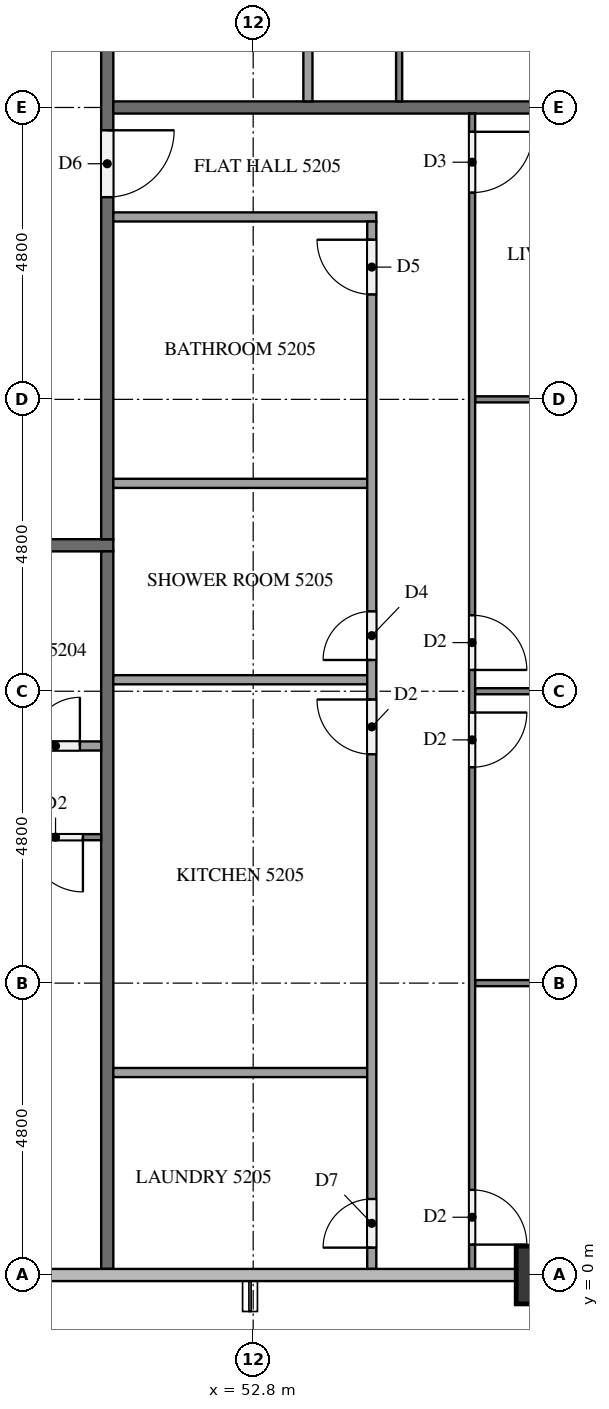
"""IFC4 building model, lengths in metres.
Left out: names, types, materials, properties, quantities, classifications, styles, units other than length and angle.
Written with IfcOpenShell. Run it as: python <this file> out.ifc"""

import sys

from ifc_helpers import new_model, si_unit, direction, frame, frame_2d, origin, origin_2d, place, context, subcontext, project, spatial, rectangle, extrude, element, fill, save


model = new_model("IFC4")
c1 = context("Model", 3, precision=1e-05, world=origin(), true_north=direction((0.0, 1.0)))
c2 = subcontext(c1, "Body", "Model", "MODEL_VIEW")
j1 = project(units=[si_unit("LENGTHUNIT", "METRE"), si_unit("PLANEANGLEUNIT", "RADIAN")], contexts=[c1])
p1 = place(None, origin())
s1 = spatial("IfcSite", under=j1, at=p1, CompositionType="ELEMENT")
p2 = place(p1, origin())
s2 = spatial("IfcBuilding", under=s1, at=p2, CompositionType="ELEMENT")
p3 = place(p2, frame((0.0, 0.0, 199.9)))
s3 = spatial("IfcBuildingStorey", under=s2, at=p3, CompositionType="ELEMENT", Elevation=199.9)
p4 = place(p3, frame((57.6, 0.0, 0.0), z_axis=(0.0, 0.0, 1.0), x_axis=(1.0, 0.0, 0.0)))
e1 = element("IfcColumn", 1, at=p4, inside=s3, PredefinedType="COLUMN", context=c2, shape_type="SweptSolid", body=[
    extrude(rectangle(XDim=0.95, YDim=0.95, at=origin_2d()), origin(), (0.0, 0.0, 1.0), 3.1),
])
p5 = place(p3, frame((50.5, 12.0, 0.0), z_axis=(0.0, 0.0, 1.0), x_axis=(-1.0, 0.0, 0.0)))
e2 = element("IfcWall", 2, at=p5, inside=s3, PredefinedType="PARTITIONING", context=c2, shape_type="SweptSolid", body=[
    extrude(rectangle(XDim=38.6, YDim=0.2, at=frame_2d((19.3, 0.0))), origin(), (0.0, 0.0, 1.0), 3.1),
])
p6 = place(p5, frame((26.875, 0.0, 0.0)))
e3 = element("IfcOpeningElement", 3, at=p6, cuts=e2, PredefinedType="OPENING", context=c2, shape_type="SweptSolid", body=[
    extrude(rectangle(XDim=1.1, YDim=2.1, at=frame_2d((0.55, 1.05))), frame((0.0, 0.11, 0.0), z_axis=(0.0, -1.0, 0.0), x_axis=(1.0, 0.0, 0.0)), (0.0, 0.0, 1.0), 0.22),
])
p7 = place(p5, frame((25.075, 0.0, 0.0)))
e4 = element("IfcOpeningElement", 4, at=p7, cuts=e2, PredefinedType="OPENING", context=c2, shape_type="SweptSolid", body=[
    extrude(rectangle(XDim=1.0, YDim=2.1, at=frame_2d((0.5, 1.05))), frame((0.0, 0.11, 0.0), z_axis=(0.0, -1.0, 0.0), x_axis=(1.0, 0.0, 0.0)), (0.0, 0.0, 1.0), 0.22),
])
p8 = place(p5, frame((10.125, 0.0, 0.0)))
e5 = element("IfcOpeningElement", 5, at=p8, cuts=e2, PredefinedType="OPENING", context=c2, shape_type="SweptSolid", body=[
    extrude(rectangle(XDim=1.0, YDim=2.1, at=frame_2d((0.5, 1.05))), frame((0.0, 0.11, 0.0), z_axis=(0.0, -1.0, 0.0), x_axis=(1.0, 0.0, 0.0)), (0.0, 0.0, 1.0), 0.22),
])
p9 = place(p5, frame((8.275, 0.0, 0.0)))
e6 = element("IfcOpeningElement", 6, at=p9, cuts=e2, PredefinedType="OPENING", context=c2, shape_type="SweptSolid", body=[
    extrude(rectangle(XDim=1.0, YDim=2.1, at=frame_2d((0.5, 1.05))), frame((0.0, 0.11, 0.0), z_axis=(0.0, -1.0, 0.0), x_axis=(1.0, 0.0, 0.0)), (0.0, 0.0, 1.0), 0.22),
])
p10 = place(p3, frame((50.4, 40.7, 0.0), z_axis=(0.0, 0.0, 1.0), x_axis=(0.0, -1.0, 0.0)))
e7 = element("IfcWall", 7, at=p10, inside=s3, PredefinedType="PARTITIONING", context=c2, shape_type="SweptSolid", body=[
    extrude(rectangle(XDim=28.6, YDim=0.2, at=frame_2d((14.3, 0.0))), origin(), (0.0, 0.0, 1.0), 3.1),
])
p11 = place(p10, frame((21.875, 0.0, 0.0)))
e8 = element("IfcOpeningElement", 8, at=p11, cuts=e7, PredefinedType="OPENING", context=c2, shape_type="SweptSolid", body=[
    extrude(rectangle(XDim=1.1, YDim=2.1, at=frame_2d((0.55, 1.05))), frame((0.0, 0.11, 0.0), z_axis=(0.0, -1.0, 0.0), x_axis=(1.0, 0.0, 0.0)), (0.0, 0.0, 1.0), 0.22),
])
p12 = place(p10, frame((7.525, 0.0, 0.0)))
e9 = element("IfcOpeningElement", 9, at=p12, cuts=e7, PredefinedType="OPENING", context=c2, shape_type="SweptSolid", body=[
    extrude(rectangle(XDim=1.0, YDim=2.1, at=frame_2d((0.5, 1.05))), frame((0.0, 0.11, 0.0), z_axis=(0.0, -1.0, 0.0), x_axis=(1.0, 0.0, 0.0)), (0.0, 0.0, 1.0), 0.22),
])
p13 = place(p10, frame((5.675, 0.0, 0.0)))
e10 = element("IfcOpeningElement", 10, at=p13, cuts=e7, PredefinedType="OPENING", context=c2, shape_type="SweptSolid", body=[
    extrude(rectangle(XDim=1.0, YDim=2.1, at=frame_2d((0.5, 1.05))), frame((0.0, 0.11, 0.0), z_axis=(0.0, -1.0, 0.0), x_axis=(1.0, 0.0, 0.0)), (0.0, 0.0, 1.0), 0.22),
])
p14 = place(p3, frame((50.4, 11.9, 0.0), z_axis=(0.0, 0.0, 1.0), x_axis=(0.0, -1.0, 0.0)))
e11 = element("IfcWall", 11, at=p14, inside=s3, PredefinedType="PARTITIONING", context=c2, shape_type="SweptSolid", body=[
    extrude(rectangle(XDim=11.8, YDim=0.2, at=frame_2d((5.9, 0.0))), origin(), (0.0, 0.0, 1.0), 3.1),
])
p15 = place(p3, frame((50.5, 19.2, 0.0), z_axis=(0.0, 0.0, 1.0), x_axis=(1.0, 0.0, 0.0)))
e12 = element("IfcWall", 12, at=p15, inside=s3, PredefinedType="PARTITIONING", context=c2, shape_type="SweptSolid", body=[
    extrude(rectangle(XDim=11.8, YDim=0.2, at=frame_2d((5.9, 0.0))), origin(), (0.0, 0.0, 1.0), 3.1),
])
p16 = place(p3, frame((50.3, 7.2, 0.0), z_axis=(0.0, 0.0, 1.0), x_axis=(-1.0, 0.0, 0.0)))
e13 = element("IfcWall", 13, at=p16, inside=s3, PredefinedType="PARTITIONING", context=c2, shape_type="SweptSolid", body=[
    extrude(rectangle(XDim=9.4, YDim=0.1, at=frame_2d((4.7, 0.0))), origin(), (0.0, 0.0, 1.0), 3.1),
])
p17 = place(p16, frame((8.1, 0.0, 0.0)))
e14 = element("IfcOpeningElement", 14, at=p17, cuts=e13, PredefinedType="OPENING", context=c2, shape_type="SweptSolid", body=[
    extrude(rectangle(XDim=1.0, YDim=2.1, at=frame_2d((0.5, 1.05))), frame((0.0, 0.06, 0.0), z_axis=(0.0, -1.0, 0.0), x_axis=(1.0, 0.0, 0.0)), (0.0, 0.0, 1.0), 0.12),
])
p18 = place(p16, frame((0.3, 0.0, 0.0)))
e15 = element("IfcOpeningElement", 15, at=p18, cuts=e13, PredefinedType="OPENING", context=c2, shape_type="SweptSolid", body=[
    extrude(rectangle(XDim=0.9, YDim=2.1, at=frame_2d((0.45, 1.05))), frame((0.0, 0.06, 0.0), z_axis=(0.0, -1.0, 0.0), x_axis=(1.0, 0.0, 0.0)), (0.0, 0.0, 1.0), 0.12),
])
p19 = place(p3, frame((42.675, 8.7, 0.0), z_axis=(0.0, 0.0, 1.0), x_axis=(1.0, 0.0, 0.0)))
e16 = element("IfcWall", 16, at=p19, inside=s3, PredefinedType="PARTITIONING", context=c2, shape_type="SweptSolid", body=[
    extrude(rectangle(XDim=7.625, YDim=0.15, at=frame_2d((3.812, 0.0))), origin(), (0.0, 0.0, 1.0), 3.1),
])
p20 = place(p19, frame((0.3, 0.0, 0.0)))
e17 = element("IfcOpeningElement", 17, at=p20, cuts=e16, PredefinedType="OPENING", context=c2, shape_type="SweptSolid", body=[
    extrude(rectangle(XDim=0.9, YDim=2.1, at=frame_2d((0.45, 1.05))), frame((0.0, 0.085, 0.0), z_axis=(0.0, -1.0, 0.0), x_axis=(1.0, 0.0, 0.0)), (0.0, 0.0, 1.0), 0.17),
])
p21 = place(p19, frame((6.475, 0.0, 0.0)))
e18 = element("IfcOpeningElement", 18, at=p21, cuts=e16, PredefinedType="OPENING", context=c2, shape_type="SweptSolid", body=[
    extrude(rectangle(XDim=0.8, YDim=2.1, at=frame_2d((0.4, 1.05))), frame((0.0, 0.085, 0.0), z_axis=(0.0, -1.0, 0.0), x_axis=(1.0, 0.0, 0.0)), (0.0, 0.0, 1.0), 0.17),
])
p22 = place(p3, frame((56.45, 14.4, 0.0), z_axis=(0.0, 0.0, 1.0), x_axis=(1.0, 0.0, 0.0)))
e19 = element("IfcWall", 19, at=p22, inside=s3, PredefinedType="PARTITIONING", context=c2, shape_type="SweptSolid", body=[
    extrude(rectangle(XDim=5.625, YDim=0.1, at=frame_2d((2.812, 0.0))), origin(), (0.0, 0.0, 1.0), 3.1),
])
p23 = place(p3, frame((56.45, 9.6, 0.0), z_axis=(0.0, 0.0, 1.0), x_axis=(1.0, 0.0, 0.0)))
e20 = element("IfcWall", 20, at=p23, inside=s3, PredefinedType="PARTITIONING", context=c2, shape_type="SweptSolid", body=[
    extrude(rectangle(XDim=5.85, YDim=0.1, at=frame_2d((2.925, 0.0))), origin(), (0.0, 0.0, 1.0), 3.1),
])
p24 = place(p3, frame((56.45, 4.8, 0.0), z_axis=(0.0, 0.0, 1.0), x_axis=(1.0, 0.0, 0.0)))
e21 = element("IfcWall", 21, at=p24, inside=s3, PredefinedType="PARTITIONING", context=c2, shape_type="SweptSolid", body=[
    extrude(rectangle(XDim=5.475, YDim=0.1, at=frame_2d((2.738, 0.0))), origin(), (0.0, 0.0, 1.0), 3.1),
])
p25 = place(p3, frame((56.4, 19.1, 0.0), z_axis=(0.0, 0.0, 1.0), x_axis=(0.0, -1.0, 0.0)))
e22 = element("IfcWall", 22, at=p25, inside=s3, PredefinedType="PARTITIONING", context=c2, shape_type="SweptSolid", body=[
    extrude(rectangle(XDim=19.0, YDim=0.1, at=frame_2d((9.5, 0.0))), origin(), (0.0, 0.0, 1.0), 3.1),
])
p26 = place(p25, frame((0.3, 0.0, 0.0)))
e23 = element("IfcOpeningElement", 23, at=p26, cuts=e22, PredefinedType="OPENING", context=c2, shape_type="SweptSolid", body=[
    extrude(rectangle(XDim=1.0, YDim=2.1, at=frame_2d((0.5, 1.05))), frame((0.0, 0.06, 0.0), z_axis=(0.0, -1.0, 0.0), x_axis=(1.0, 0.0, 0.0)), (0.0, 0.0, 1.0), 0.12),
])
p27 = place(p25, frame((8.25, 0.0, 0.0)))
e24 = element("IfcOpeningElement", 24, at=p27, cuts=e22, PredefinedType="OPENING", context=c2, shape_type="SweptSolid", body=[
    extrude(rectangle(XDim=0.9, YDim=2.1, at=frame_2d((0.45, 1.05))), frame((0.0, 0.06, 0.0), z_axis=(0.0, -1.0, 0.0), x_axis=(1.0, 0.0, 0.0)), (0.0, 0.0, 1.0), 0.12),
])
p28 = place(p25, frame((9.85, 0.0, 0.0)))
e25 = element("IfcOpeningElement", 25, at=p28, cuts=e22, PredefinedType="OPENING", context=c2, shape_type="SweptSolid", body=[
    extrude(rectangle(XDim=0.9, YDim=2.1, at=frame_2d((0.45, 1.05))), frame((0.0, 0.06, 0.0), z_axis=(0.0, -1.0, 0.0), x_axis=(1.0, 0.0, 0.0)), (0.0, 0.0, 1.0), 0.12),
])
p29 = place(p25, frame((17.7, 0.0, 0.0)))
e26 = element("IfcOpeningElement", 26, at=p29, cuts=e22, PredefinedType="OPENING", context=c2, shape_type="SweptSolid", body=[
    extrude(rectangle(XDim=0.9, YDim=2.1, at=frame_2d((0.45, 1.05))), frame((0.0, 0.06, 0.0), z_axis=(0.0, -1.0, 0.0), x_axis=(1.0, 0.0, 0.0)), (0.0, 0.0, 1.0), 0.12),
])
for number, where, z_axis, x_axis in (
    (27, (50.5, 13.019, 0.0), (0.0, 0.0, 1.0), (1.0, 0.0, 0.0)),
    (28, (50.5, 9.789, 0.0), (0.0, 0.0, 1.0), (1.0, 0.0, 0.0)),
    (29, (50.5, 3.33, 0.0), (0.0, 0.0, 1.0), (1.0, 0.0, 0.0)),
):
    element("IfcWall", number, at=place(p3, frame(where, z_axis=z_axis, x_axis=x_axis)), inside=s3, PredefinedType="PARTITIONING", context=c2, shape_type="SweptSolid", body=[
        extrude(rectangle(XDim=4.175, YDim=0.15, at=frame_2d((2.087, 0.0))), origin(), (0.0, 0.0, 1.0), 3.1),
    ])
p30 = place(p3, frame((50.5, 17.4, 0.0), z_axis=(0.0, 0.0, 1.0), x_axis=(1.0, 0.0, 0.0)))
e30 = element("IfcWall", 30, at=p30, inside=s3, PredefinedType="PARTITIONING", context=c2, shape_type="SweptSolid", body=[
    extrude(rectangle(XDim=4.325, YDim=0.15, at=frame_2d((2.163, 0.0))), origin(), (0.0, 0.0, 1.0), 3.1),
])
p31 = place(p3, frame((54.75, 0.1, 0.0), z_axis=(0.0, 0.0, 1.0), x_axis=(0.0, 1.0, 0.0)))
e31 = element("IfcWall", 31, at=p31, inside=s3, PredefinedType="PARTITIONING", context=c2, shape_type="SweptSolid", body=[
    extrude(rectangle(XDim=17.225, YDim=0.15, at=frame_2d((8.612, 0.0))), origin(), (0.0, 0.0, 1.0), 3.1),
])
p32 = place(p31, frame((16.025, 0.0, 0.0)))
e32 = element("IfcOpeningElement", 32, at=p32, cuts=e31, PredefinedType="OPENING", context=c2, shape_type="SweptSolid", body=[
    extrude(rectangle(XDim=0.9, YDim=2.1, at=frame_2d((0.45, 1.05))), frame((0.0, 0.085, 0.0), z_axis=(0.0, -1.0, 0.0), x_axis=(1.0, 0.0, 0.0)), (0.0, 0.0, 1.0), 0.17),
])
p33 = place(p31, frame((10.014, 0.0, 0.0)))
e33 = element("IfcOpeningElement", 33, at=p33, cuts=e31, PredefinedType="OPENING", context=c2, shape_type="SweptSolid", body=[
    extrude(rectangle(XDim=0.8, YDim=2.1, at=frame_2d((0.4, 1.05))), frame((0.0, 0.085, 0.0), z_axis=(0.0, -1.0, 0.0), x_axis=(1.0, 0.0, 0.0)), (0.0, 0.0, 1.0), 0.17),
])
p34 = place(p31, frame((8.464, 0.0, 0.0)))
e34 = element("IfcOpeningElement", 34, at=p34, cuts=e31, PredefinedType="OPENING", context=c2, shape_type="SweptSolid", body=[
    extrude(rectangle(XDim=0.9, YDim=2.1, at=frame_2d((0.45, 1.05))), frame((0.0, 0.085, 0.0), z_axis=(0.0, -1.0, 0.0), x_axis=(1.0, 0.0, 0.0)), (0.0, 0.0, 1.0), 0.17),
])
p35 = place(p31, frame((0.35, 0.0, 0.0)))
e35 = element("IfcOpeningElement", 35, at=p35, cuts=e31, PredefinedType="OPENING", context=c2, shape_type="SweptSolid", body=[
    extrude(rectangle(XDim=0.8, YDim=2.1, at=frame_2d((0.4, 1.05))), frame((0.0, 0.085, 0.0), z_axis=(0.0, -1.0, 0.0), x_axis=(1.0, 0.0, 0.0)), (0.0, 0.0, 1.0), 0.17),
])
p36 = place(p3, frame((55.2, 33.5, 0.0), z_axis=(0.0, 0.0, 1.0), x_axis=(0.0, -1.0, 0.0)))
e36 = element("IfcWall", 36, at=p36, inside=s3, PredefinedType="PARTITIONING", context=c2, shape_type="SweptSolid", body=[
    extrude(rectangle(XDim=14.2, YDim=0.1, at=frame_2d((7.1, 0.0))), origin(), (0.0, 0.0, 1.0), 3.1),
])
p37 = place(p36, frame((0.3, 0.0, 0.0)))
e37 = element("IfcOpeningElement", 37, at=p37, cuts=e36, PredefinedType="OPENING", context=c2, shape_type="SweptSolid", body=[
    extrude(rectangle(XDim=1.0, YDim=2.1, at=frame_2d((0.5, 1.05))), frame((0.0, 0.06, 0.0), z_axis=(0.0, -1.0, 0.0), x_axis=(1.0, 0.0, 0.0)), (0.0, 0.0, 1.0), 0.12),
])
p38 = place(p36, frame((8.25, 0.0, 0.0)))
e38 = element("IfcOpeningElement", 38, at=p38, cuts=e36, PredefinedType="OPENING", context=c2, shape_type="SweptSolid", body=[
    extrude(rectangle(XDim=0.9, YDim=2.1, at=frame_2d((0.45, 1.05))), frame((0.0, 0.06, 0.0), z_axis=(0.0, -1.0, 0.0), x_axis=(1.0, 0.0, 0.0)), (0.0, 0.0, 1.0), 0.12),
])
p39 = place(p36, frame((9.85, 0.0, 0.0)))
e39 = element("IfcOpeningElement", 39, at=p39, cuts=e36, PredefinedType="OPENING", context=c2, shape_type="SweptSolid", body=[
    extrude(rectangle(XDim=0.9, YDim=2.1, at=frame_2d((0.45, 1.05))), frame((0.0, 0.06, 0.0), z_axis=(0.0, -1.0, 0.0), x_axis=(1.0, 0.0, 0.0)), (0.0, 0.0, 1.0), 0.12),
])
p40 = place(p3, frame((53.7, 19.3, 0.0), z_axis=(0.0, 0.0, 1.0), x_axis=(0.0, 1.0, 0.0)))
e40 = element("IfcWall", 40, at=p40, inside=s3, PredefinedType="PARTITIONING", context=c2, shape_type="SweptSolid", body=[
    extrude(rectangle(XDim=12.425, YDim=0.15, at=frame_2d((6.212, 0.0))), origin(), (0.0, 0.0, 1.0), 3.1),
])
p41 = place(p40, frame((11.325, 0.0, 0.0)))
e41 = element("IfcOpeningElement", 41, at=p41, cuts=e40, PredefinedType="OPENING", context=c2, shape_type="SweptSolid", body=[
    extrude(rectangle(XDim=0.8, YDim=2.1, at=frame_2d((0.4, 1.05))), frame((0.0, 0.085, 0.0), z_axis=(0.0, -1.0, 0.0), x_axis=(1.0, 0.0, 0.0)), (0.0, 0.0, 1.0), 0.17),
])
p42 = place(p40, frame((4.148, 0.0, 0.0)))
e42 = element("IfcOpeningElement", 42, at=p42, cuts=e40, PredefinedType="OPENING", context=c2, shape_type="SweptSolid", body=[
    extrude(rectangle(XDim=0.9, YDim=2.1, at=frame_2d((0.45, 1.05))), frame((0.0, 0.085, 0.0), z_axis=(0.0, -1.0, 0.0), x_axis=(1.0, 0.0, 0.0)), (0.0, 0.0, 1.0), 0.17),
])
p43 = place(p40, frame((2.598, 0.0, 0.0)))
e43 = element("IfcOpeningElement", 43, at=p43, cuts=e40, PredefinedType="OPENING", context=c2, shape_type="SweptSolid", body=[
    extrude(rectangle(XDim=0.9, YDim=2.1, at=frame_2d((0.45, 1.05))), frame((0.0, 0.085, 0.0), z_axis=(0.0, -1.0, 0.0), x_axis=(1.0, 0.0, 0.0)), (0.0, 0.0, 1.0), 0.17),
])
p44 = place(p11, origin())
e44 = element("IfcDoor", 44, at=p44, inside=s3, OperationType="SINGLE_SWING_LEFT", PredefinedType="DOOR", context=c2, shape_type="SweptSolid", body=[
    extrude(rectangle(XDim=1.1, YDim=2.1, at=frame_2d((0.55, 1.05))), frame((0.0, 0.025, 0.0), z_axis=(0.0, -1.0, 0.0), x_axis=(1.0, 0.0, 0.0)), (0.0, 0.0, 1.0), 0.05),
])
fill(e8, e44)
p45 = place(p18, origin())
e45 = element("IfcDoor", 45, at=p45, inside=s3, OperationType="SINGLE_SWING_LEFT", PredefinedType="DOOR", context=c2, shape_type="SweptSolid", body=[
    extrude(rectangle(XDim=0.9, YDim=2.1, at=frame_2d((0.45, 1.05))), frame((0.0, 0.025, 0.0), z_axis=(0.0, -1.0, 0.0), x_axis=(1.0, 0.0, 0.0)), (0.0, 0.0, 1.0), 0.05),
])
fill(e15, e45)
p46 = place(p21, origin())
e46 = element("IfcDoor", 46, at=p46, inside=s3, OperationType="SINGLE_SWING_RIGHT", PredefinedType="DOOR", context=c2, shape_type="SweptSolid", body=[
    extrude(rectangle(XDim=0.8, YDim=2.1, at=frame_2d((0.4, 1.05))), frame((0.0, 0.025, 0.0), z_axis=(0.0, -1.0, 0.0), x_axis=(1.0, 0.0, 0.0)), (0.0, 0.0, 1.0), 0.05),
])
fill(e18, e46)
p47 = place(p26, origin())
e47 = element("IfcDoor", 47, at=p47, inside=s3, OperationType="SINGLE_SWING_LEFT", PredefinedType="DOOR", context=c2, shape_type="SweptSolid", body=[
    extrude(rectangle(XDim=1.0, YDim=2.1, at=frame_2d((0.5, 1.05))), frame((0.0, 0.025, 0.0), z_axis=(0.0, -1.0, 0.0), x_axis=(1.0, 0.0, 0.0)), (0.0, 0.0, 1.0), 0.05),
])
fill(e23, e47)
p48 = place(p27, origin())
e48 = element("IfcDoor", 48, at=p48, inside=s3, OperationType="SINGLE_SWING_RIGHT", PredefinedType="DOOR", context=c2, shape_type="SweptSolid", body=[
    extrude(rectangle(XDim=0.9, YDim=2.1, at=frame_2d((0.45, 1.05))), frame((0.0, 0.025, 0.0), z_axis=(0.0, -1.0, 0.0), x_axis=(1.0, 0.0, 0.0)), (0.0, 0.0, 1.0), 0.05),
])
fill(e24, e48)
p49 = place(p28, origin())
e49 = element("IfcDoor", 49, at=p49, inside=s3, OperationType="SINGLE_SWING_LEFT", PredefinedType="DOOR", context=c2, shape_type="SweptSolid", body=[
    extrude(rectangle(XDim=0.9, YDim=2.1, at=frame_2d((0.45, 1.05))), frame((0.0, 0.025, 0.0), z_axis=(0.0, -1.0, 0.0), x_axis=(1.0, 0.0, 0.0)), (0.0, 0.0, 1.0), 0.05),
])
fill(e25, e49)
p50 = place(p29, origin())
e50 = element("IfcDoor", 50, at=p50, inside=s3, OperationType="SINGLE_SWING_RIGHT", PredefinedType="DOOR", context=c2, shape_type="SweptSolid", body=[
    extrude(rectangle(XDim=0.9, YDim=2.1, at=frame_2d((0.45, 1.05))), frame((0.0, 0.025, 0.0), z_axis=(0.0, -1.0, 0.0), x_axis=(1.0, 0.0, 0.0)), (0.0, 0.0, 1.0), 0.05),
])
fill(e26, e50)
p51 = place(p32, origin())
e51 = element("IfcDoor", 51, at=p51, inside=s3, OperationType="SINGLE_SWING_RIGHT", PredefinedType="DOOR", context=c2, shape_type="SweptSolid", body=[
    extrude(rectangle(XDim=0.9, YDim=2.1, at=frame_2d((0.45, 1.05))), frame((0.0, 0.025, 0.0), z_axis=(0.0, -1.0, 0.0), x_axis=(1.0, 0.0, 0.0)), (0.0, 0.0, 1.0), 0.05),
])
fill(e32, e51)
p52 = place(p33, origin())
e52 = element("IfcDoor", 52, at=p52, inside=s3, OperationType="SINGLE_SWING_LEFT", PredefinedType="DOOR", context=c2, shape_type="SweptSolid", body=[
    extrude(rectangle(XDim=0.8, YDim=2.1, at=frame_2d((0.4, 1.05))), frame((0.0, 0.025, 0.0), z_axis=(0.0, -1.0, 0.0), x_axis=(1.0, 0.0, 0.0)), (0.0, 0.0, 1.0), 0.05),
])
fill(e33, e52)
p53 = place(p34, origin())
e53 = element("IfcDoor", 53, at=p53, inside=s3, OperationType="SINGLE_SWING_RIGHT", PredefinedType="DOOR", context=c2, shape_type="SweptSolid", body=[
    extrude(rectangle(XDim=0.9, YDim=2.1, at=frame_2d((0.45, 1.05))), frame((0.0, 0.025, 0.0), z_axis=(0.0, -1.0, 0.0), x_axis=(1.0, 0.0, 0.0)), (0.0, 0.0, 1.0), 0.05),
])
fill(e34, e53)
p54 = place(p35, origin())
e54 = element("IfcDoor", 54, at=p54, inside=s3, OperationType="SINGLE_SWING_LEFT", PredefinedType="DOOR", context=c2, shape_type="SweptSolid", body=[
    extrude(rectangle(XDim=0.8, YDim=2.1, at=frame_2d((0.4, 1.05))), frame((0.0, 0.025, 0.0), z_axis=(0.0, -1.0, 0.0), x_axis=(1.0, 0.0, 0.0)), (0.0, 0.0, 1.0), 0.05),
])
fill(e35, e54)
save(model, sys.argv[1])
